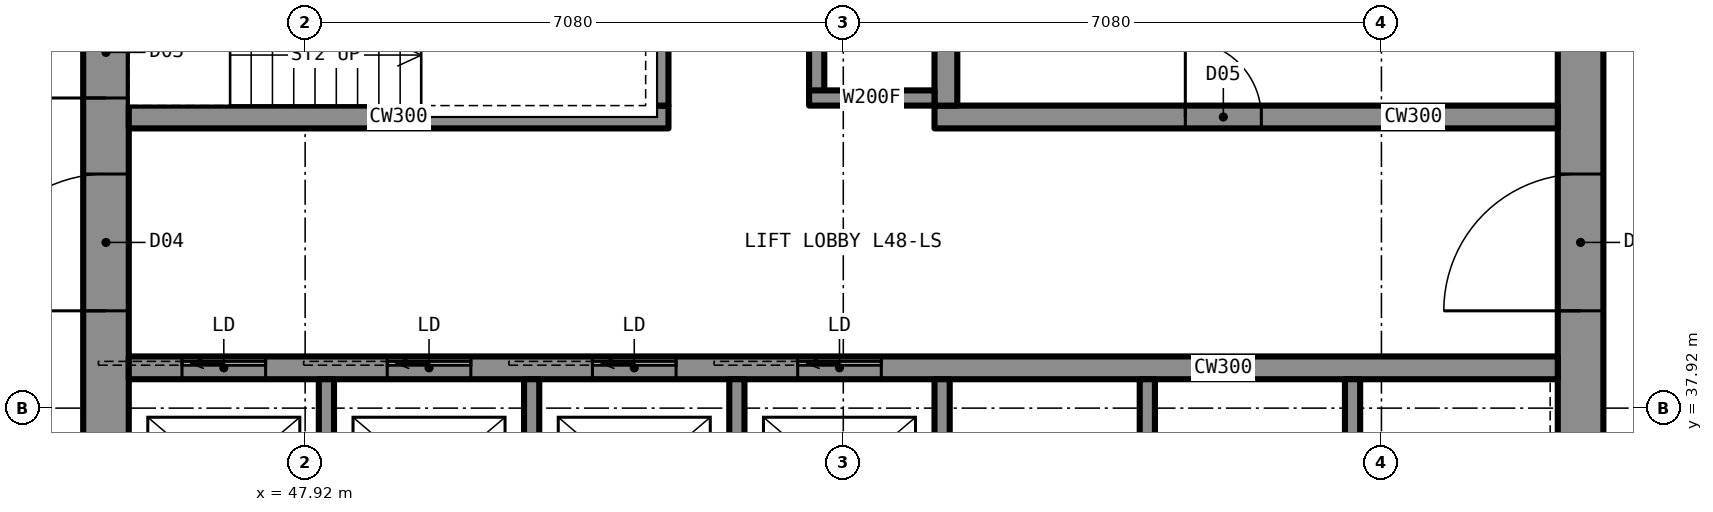
"""IFC4 building model, lengths in metres.
Left out: names, types, materials, properties, quantities, classifications, styles, units other than length and angle.
Written with IfcOpenShell. Run it as: python <this file> out.ifc"""

import sys

from ifc_helpers import new_model, si_unit, direction, frame, frame_2d, origin, place, context, subcontext, project, spatial, rectangle, extrude, element, fill, save


model = new_model("IFC4")
c1 = context("Model", 3, precision=1e-05, world=origin(), true_north=direction((0.0, 1.0)))
c2 = subcontext(c1, "Body", "Model", "MODEL_VIEW")
j1 = project(units=[si_unit("LENGTHUNIT", "METRE"), si_unit("PLANEANGLEUNIT", "RADIAN")], contexts=[c1])
p1 = place(None, origin())
s1 = spatial("IfcSite", under=j1, at=p1, CompositionType="ELEMENT")
p2 = place(p1, origin())
s2 = spatial("IfcBuilding", under=s1, at=p2, CompositionType="ELEMENT")
p3 = place(p2, frame((0.0, 0.0, 172.3)))
s3 = spatial("IfcBuildingStorey", under=s2, at=p3, CompositionType="ELEMENT", Elevation=172.3)
p4 = place(p3, frame((64.7, 35.6, 0.0), z_axis=(0.0, 0.0, 1.0), x_axis=(0.0, 1.0, 0.0)))
e1 = element("IfcWall", 1, at=p4, inside=s3, PredefinedType="SHEAR", context=c2, shape_type="SweptSolid", body=[
    extrude(rectangle(XDim=18.8, YDim=0.6, at=frame_2d((9.4, 0.0))), origin(), (0.0, 0.0, 1.0), 3.5),
])
p5 = place(p4, frame((13.4, 0.0, 0.0)))
e2 = element("IfcOpeningElement", 2, at=p5, cuts=e1, PredefinedType="OPENING", context=c2, shape_type="SweptSolid", body=[
    extrude(rectangle(XDim=1.8, YDim=2.2, at=frame_2d((0.9, 1.1))), frame((0.0, 0.31, 0.0), z_axis=(0.0, -1.0, 0.0), x_axis=(1.0, 0.0, 0.0)), (0.0, 0.0, 1.0), 0.62),
])
p6 = place(p4, frame((3.6, 0.0, 0.0)))
e3 = element("IfcOpeningElement", 3, at=p6, cuts=e1, PredefinedType="OPENING", context=c2, shape_type="SweptSolid", body=[
    extrude(rectangle(XDim=1.8, YDim=2.2, at=frame_2d((0.9, 1.1))), frame((0.0, 0.31, 0.0), z_axis=(0.0, -1.0, 0.0), x_axis=(1.0, 0.0, 0.0)), (0.0, 0.0, 1.0), 0.62),
])
p7 = place(p3, frame((45.3, 35.6, 0.0), z_axis=(0.0, 0.0, 1.0), x_axis=(0.0, 1.0, 0.0)))
e4 = element("IfcWall", 4, at=p7, inside=s3, PredefinedType="SHEAR", context=c2, shape_type="SweptSolid", body=[
    extrude(rectangle(XDim=18.8, YDim=0.6, at=frame_2d((9.4, 0.0))), origin(), (0.0, 0.0, 1.0), 3.5),
])
p8 = place(p7, frame((13.4, 0.0, 0.0)))
e5 = element("IfcOpeningElement", 5, at=p8, cuts=e4, PredefinedType="OPENING", context=c2, shape_type="SweptSolid", body=[
    extrude(rectangle(XDim=1.8, YDim=2.2, at=frame_2d((0.9, 1.1))), frame((0.0, 0.31, 0.0), z_axis=(0.0, -1.0, 0.0), x_axis=(1.0, 0.0, 0.0)), (0.0, 0.0, 1.0), 0.62),
])
p9 = place(p7, frame((3.6, 0.0, 0.0)))
e6 = element("IfcOpeningElement", 6, at=p9, cuts=e4, PredefinedType="OPENING", context=c2, shape_type="SweptSolid", body=[
    extrude(rectangle(XDim=1.8, YDim=2.2, at=frame_2d((0.9, 1.1))), frame((0.0, 0.31, 0.0), z_axis=(0.0, -1.0, 0.0), x_axis=(1.0, 0.0, 0.0)), (0.0, 0.0, 1.0), 0.62),
])
p10 = place(p7, frame((6.4, 0.0, 0.0)))
e7 = element("IfcOpeningElement", 7, at=p10, cuts=e4, PredefinedType="OPENING", context=c2, shape_type="SweptSolid", body=[
    extrude(rectangle(XDim=1.2, YDim=2.2, at=frame_2d((0.6, 1.1))), frame((0.0, 0.31, 0.0), z_axis=(0.0, -1.0, 0.0), x_axis=(1.0, 0.0, 0.0)), (0.0, 0.0, 1.0), 0.62),
])
p11 = place(p3, frame((45.6, 38.45, 0.0), z_axis=(0.0, 0.0, 1.0), x_axis=(1.0, 0.0, 0.0)))
e8 = element("IfcWall", 8, at=p11, inside=s3, PredefinedType="SHEAR", context=c2, shape_type="SweptSolid", body=[
    extrude(rectangle(XDim=18.8, YDim=0.3, at=frame_2d((9.4, 0.0))), origin(), (0.0, 0.0, 1.0), 3.5),
])
p12 = place(p11, frame((0.7, 0.0, 0.0)))
e9 = element("IfcOpeningElement", 9, at=p12, cuts=e8, PredefinedType="OPENING", context=c2, shape_type="SweptSolid", body=[
    extrude(rectangle(XDim=1.1, YDim=2.2, at=frame_2d((0.55, 1.1))), frame((0.0, 0.16, 0.0), z_axis=(0.0, -1.0, 0.0), x_axis=(1.0, 0.0, 0.0)), (0.0, 0.0, 1.0), 0.32),
])
p13 = place(p11, frame((3.4, 0.0, 0.0)))
e10 = element("IfcOpeningElement", 10, at=p13, cuts=e8, PredefinedType="OPENING", context=c2, shape_type="SweptSolid", body=[
    extrude(rectangle(XDim=1.1, YDim=2.2, at=frame_2d((0.55, 1.1))), frame((0.0, 0.16, 0.0), z_axis=(0.0, -1.0, 0.0), x_axis=(1.0, 0.0, 0.0)), (0.0, 0.0, 1.0), 0.32),
])
p14 = place(p11, frame((6.1, 0.0, 0.0)))
e11 = element("IfcOpeningElement", 11, at=p14, cuts=e8, PredefinedType="OPENING", context=c2, shape_type="SweptSolid", body=[
    extrude(rectangle(XDim=1.1, YDim=2.2, at=frame_2d((0.55, 1.1))), frame((0.0, 0.16, 0.0), z_axis=(0.0, -1.0, 0.0), x_axis=(1.0, 0.0, 0.0)), (0.0, 0.0, 1.0), 0.32),
])
p15 = place(p11, frame((8.8, 0.0, 0.0)))
e12 = element("IfcOpeningElement", 12, at=p15, cuts=e8, PredefinedType="OPENING", context=c2, shape_type="SweptSolid", body=[
    extrude(rectangle(XDim=1.1, YDim=2.2, at=frame_2d((0.55, 1.1))), frame((0.0, 0.16, 0.0), z_axis=(0.0, -1.0, 0.0), x_axis=(1.0, 0.0, 0.0)), (0.0, 0.0, 1.0), 0.32),
])
p16 = place(p3, frame((45.6, 41.75, 0.0), z_axis=(0.0, 0.0, 1.0), x_axis=(1.0, 0.0, 0.0)))
e13 = element("IfcWall", 13, at=p16, inside=s3, PredefinedType="SHEAR", context=c2, shape_type="SweptSolid", body=[
    extrude(rectangle(XDim=7.1, YDim=0.3, at=frame_2d((3.55, 0.0))), origin(), (0.0, 0.0, 1.0), 3.5),
])
p17 = place(p3, frame((56.2, 41.75, 0.0), z_axis=(0.0, 0.0, 1.0), x_axis=(1.0, 0.0, 0.0)))
e14 = element("IfcWall", 14, at=p17, inside=s3, PredefinedType="SHEAR", context=c2, shape_type="SweptSolid", body=[
    extrude(rectangle(XDim=8.2, YDim=0.3, at=frame_2d((4.1, 0.0))), origin(), (0.0, 0.0, 1.0), 3.5),
])
p18 = place(p17, frame((3.3, 0.0, 0.0)))
e15 = element("IfcOpeningElement", 15, at=p18, cuts=e14, PredefinedType="OPENING", context=c2, shape_type="SweptSolid", body=[
    extrude(rectangle(XDim=1.0, YDim=2.1, at=frame_2d((0.5, 1.05))), frame((0.0, 0.16, 0.0), z_axis=(0.0, -1.0, 0.0), x_axis=(1.0, 0.0, 0.0)), (0.0, 0.0, 1.0), 0.32),
])
p19 = place(p3, frame((52.55, 41.9, 0.0), z_axis=(0.0, 0.0, 1.0), x_axis=(0.0, 1.0, 0.0)))
e16 = element("IfcWall", 16, at=p19, inside=s3, PredefinedType="SHEAR", context=c2, shape_type="SweptSolid", body=[
    extrude(rectangle(XDim=6.2, YDim=0.3, at=frame_2d((3.1, 0.0))), origin(), (0.0, 0.0, 1.0), 3.5),
])
p20 = place(p19, frame((4.125, 0.0, 0.0)))
e17 = element("IfcOpeningElement", 17, at=p20, cuts=e16, PredefinedType="OPENING", context=c2, shape_type="SweptSolid", body=[
    extrude(rectangle(XDim=1.2, YDim=2.2, at=frame_2d((0.6, 1.1))), frame((0.0, 0.16, 0.0), z_axis=(0.0, -1.0, 0.0), x_axis=(1.0, 0.0, 0.0)), (0.0, 0.0, 1.0), 0.32),
])
p21 = place(p3, frame((56.35, 41.9, 0.0), z_axis=(0.0, 0.0, 1.0), x_axis=(0.0, 1.0, 0.0)))
e18 = element("IfcWall", 18, at=p21, inside=s3, PredefinedType="SHEAR", context=c2, shape_type="SweptSolid", body=[
    extrude(rectangle(XDim=9.5, YDim=0.3, at=frame_2d((4.75, 0.0))), origin(), (0.0, 0.0, 1.0), 3.5),
])
p22 = place(p21, frame((7.1, 0.0, 0.0)))
e19 = element("IfcOpeningElement", 19, at=p22, cuts=e18, PredefinedType="OPENING", context=c2, shape_type="SweptSolid", body=[
    extrude(rectangle(XDim=1.8, YDim=2.2, at=frame_2d((0.9, 1.1))), frame((0.0, 0.16, 0.0), z_axis=(0.0, -1.0, 0.0), x_axis=(1.0, 0.0, 0.0)), (0.0, 0.0, 1.0), 0.32),
])
for number, where, z_axis, x_axis in (
    (20, (48.2, 35.6, 0.0), (0.0, 0.0, 1.0), (0.0, 1.0, 0.0)),
    (21, (50.9, 35.6, 0.0), (0.0, 0.0, 1.0), (0.0, 1.0, 0.0)),
    (22, (53.6, 35.6, 0.0), (0.0, 0.0, 1.0), (0.0, 1.0, 0.0)),
    (23, (56.3, 35.6, 0.0), (0.0, 0.0, 1.0), (0.0, 1.0, 0.0)),
    (24, (59.0, 35.6, 0.0), (0.0, 0.0, 1.0), (0.0, 1.0, 0.0)),
    (25, (61.7, 35.6, 0.0), (0.0, 0.0, 1.0), (0.0, 1.0, 0.0)),
):
    element("IfcWall", number, at=place(p3, frame(where, z_axis=z_axis, x_axis=x_axis)), inside=s3, PredefinedType="PARTITIONING", context=c2, shape_type="SweptSolid", body=[
        extrude(rectangle(XDim=2.7, YDim=0.2, at=frame_2d((1.35, 0.0))), origin(), (0.0, 0.0, 1.0), 3.33),
    ])
p23 = place(p9, origin())
e26 = element("IfcDoor", 26, at=p23, inside=s3, OperationType="DOUBLE_DOOR_SINGLE_SWING", PredefinedType="DOOR", context=c2, shape_type="SweptSolid", body=[
    extrude(rectangle(XDim=1.8, YDim=2.2, at=frame_2d((0.9, 1.1))), frame((0.0, 0.025, 0.0), z_axis=(0.0, -1.0, 0.0), x_axis=(1.0, 0.0, 0.0)), (0.0, 0.0, 1.0), 0.05),
])
fill(e6, e26)
p24 = place(p6, origin())
e27 = element("IfcDoor", 27, at=p24, inside=s3, OperationType="DOUBLE_DOOR_SINGLE_SWING", PredefinedType="DOOR", context=c2, shape_type="SweptSolid", body=[
    extrude(rectangle(XDim=1.8, YDim=2.2, at=frame_2d((0.9, 1.1))), frame((0.0, 0.025, 0.0), z_axis=(0.0, -1.0, 0.0), x_axis=(1.0, 0.0, 0.0)), (0.0, 0.0, 1.0), 0.05),
])
fill(e3, e27)
p25 = place(p10, origin())
e28 = element("IfcDoor", 28, at=p25, inside=s3, OperationType="SINGLE_SWING_LEFT", PredefinedType="DOOR", context=c2, shape_type="SweptSolid", body=[
    extrude(rectangle(XDim=1.2, YDim=2.2, at=frame_2d((0.6, 1.1))), frame((0.0, 0.025, 0.0), z_axis=(0.0, -1.0, 0.0), x_axis=(1.0, 0.0, 0.0)), (0.0, 0.0, 1.0), 0.05),
])
fill(e7, e28)
p26 = place(p18, origin())
e29 = element("IfcDoor", 29, at=p26, inside=s3, OperationType="SINGLE_SWING_LEFT", PredefinedType="DOOR", context=c2, shape_type="SweptSolid", body=[
    extrude(rectangle(XDim=1.0, YDim=2.1, at=frame_2d((0.5, 1.05))), frame((0.0, 0.025, 0.0), z_axis=(0.0, -1.0, 0.0), x_axis=(1.0, 0.0, 0.0)), (0.0, 0.0, 1.0), 0.05),
])
fill(e15, e29)
p27 = place(p12, origin())
e30 = element("IfcDoor", 30, at=p27, inside=s3, OperationType="SLIDING_TO_LEFT", PredefinedType="DOOR", context=c2, shape_type="SweptSolid", body=[
    extrude(rectangle(XDim=1.1, YDim=2.2, at=frame_2d((0.55, 1.1))), frame((0.0, 0.025, 0.0), z_axis=(0.0, -1.0, 0.0), x_axis=(1.0, 0.0, 0.0)), (0.0, 0.0, 1.0), 0.05),
])
fill(e9, e30)
p28 = place(p13, origin())
e31 = element("IfcDoor", 31, at=p28, inside=s3, OperationType="SLIDING_TO_LEFT", PredefinedType="DOOR", context=c2, shape_type="SweptSolid", body=[
    extrude(rectangle(XDim=1.1, YDim=2.2, at=frame_2d((0.55, 1.1))), frame((0.0, 0.025, 0.0), z_axis=(0.0, -1.0, 0.0), x_axis=(1.0, 0.0, 0.0)), (0.0, 0.0, 1.0), 0.05),
])
fill(e10, e31)
p29 = place(p14, origin())
e32 = element("IfcDoor", 32, at=p29, inside=s3, OperationType="SLIDING_TO_LEFT", PredefinedType="DOOR", context=c2, shape_type="SweptSolid", body=[
    extrude(rectangle(XDim=1.1, YDim=2.2, at=frame_2d((0.55, 1.1))), frame((0.0, 0.025, 0.0), z_axis=(0.0, -1.0, 0.0), x_axis=(1.0, 0.0, 0.0)), (0.0, 0.0, 1.0), 0.05),
])
fill(e11, e32)
p30 = place(p15, origin())
e33 = element("IfcDoor", 33, at=p30, inside=s3, OperationType="SLIDING_TO_LEFT", PredefinedType="DOOR", context=c2, shape_type="SweptSolid", body=[
    extrude(rectangle(XDim=1.1, YDim=2.2, at=frame_2d((0.55, 1.1))), frame((0.0, 0.025, 0.0), z_axis=(0.0, -1.0, 0.0), x_axis=(1.0, 0.0, 0.0)), (0.0, 0.0, 1.0), 0.05),
])
fill(e12, e33)
save(model, sys.argv[1])
